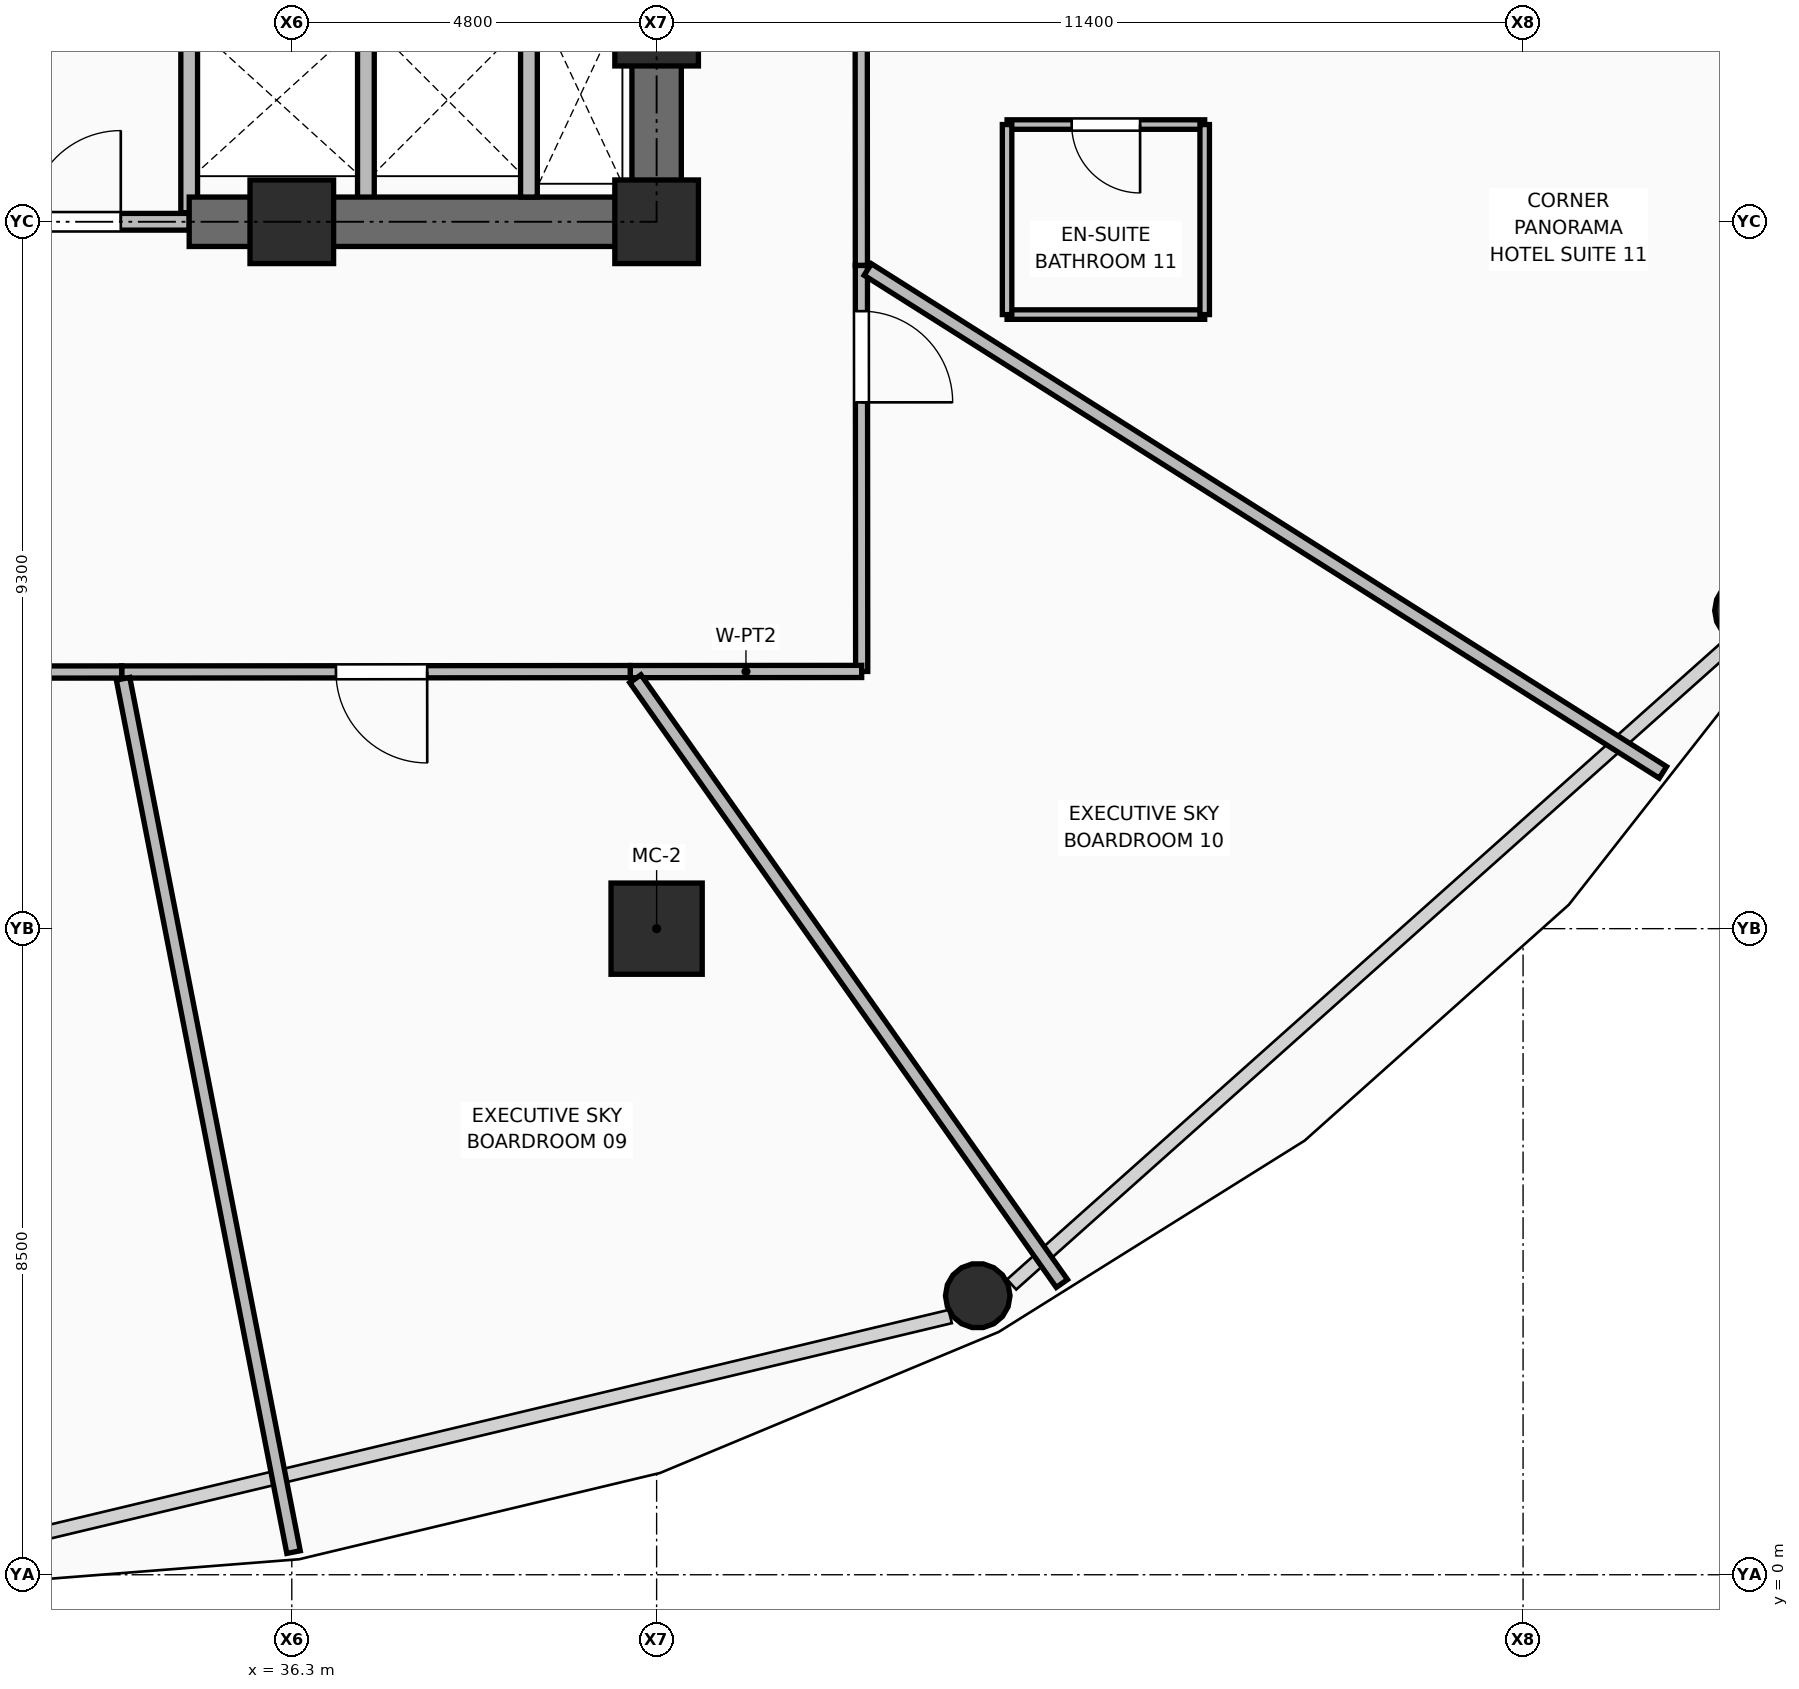
"""IFC4 building model, lengths in metres.
Left out: names, types, materials, properties, quantities, classifications, styles, units other than length and angle.
Written with IfcOpenShell. Run it as: python <this file> out.ifc"""

import sys

from ifc_helpers import new_model, si_unit, direction, frame, frame_2d, origin, origin_2d, place, context, subcontext, project, spatial, rectangle, hollow_rectangle, hollow_circle, extrude, element, fill, save


model = new_model("IFC4")
c1 = context("Model", 3, precision=1e-05, world=origin(), true_north=direction((0.0, 1.0)))
c2 = subcontext(c1, "Body", "Model", "MODEL_VIEW")
j1 = project(units=[si_unit("LENGTHUNIT", "METRE"), si_unit("PLANEANGLEUNIT", "RADIAN")], contexts=[c1])
p1 = place(None, origin())
s1 = spatial("IfcSite", under=j1, at=p1, CompositionType="ELEMENT")
p2 = place(p1, origin())
s2 = spatial("IfcBuilding", under=s1, at=p2, CompositionType="ELEMENT")
p3 = place(p2, frame((0.0, 0.0, 72.0)))
s3 = spatial("IfcBuildingStorey", under=s2, at=p3, CompositionType="ELEMENT", Elevation=72.0)
for number, where, z_axis, x_axis in (
    (1, (36.3, 17.8, 0.0), (0.0, 0.0, 1.0), (1.0, 0.0, 0.0)),
    (2, (41.1, 17.8, 0.0), (0.0, 0.0, 1.0), (1.0, 0.0, 0.0)),
    (3, (41.1, 20.4, 0.0), (0.0, 0.0, 1.0), (1.0, 0.0, 0.0)),
):
    element("IfcColumn", number, at=place(p3, frame(where, z_axis=z_axis, x_axis=x_axis)), inside=s3, PredefinedType="COLUMN", context=c2, shape_type="SweptSolid", body=[
        extrude(rectangle(XDim=1.1, YDim=1.1, at=origin_2d()), origin(), (0.0, 0.0, 1.0), 3.75),
    ])
p4 = place(p3, frame((41.1, 8.5, 0.0), z_axis=(0.0, 0.0, 1.0), x_axis=(1.0, 0.0, 0.0)))
e4 = element("IfcColumn", 4, at=p4, inside=s3, PredefinedType="COLUMN", context=c2, shape_type="SweptSolid", body=[
    extrude(hollow_rectangle(XDim=1.2, YDim=1.2, WallThickness=0.045, at=origin_2d()), origin(), (0.0, 0.0, 1.0), 3.75),
])
for number, where, z_axis, x_axis in (
    (5, (45.325, 3.671, 0.0), (0.0, 0.0, 1.0), (1.0, 0.0, 0.0)),
    (6, (55.446, 12.685, 0.0), (0.0, 0.0, 1.0), (1.0, 0.0, 0.0)),
):
    element("IfcColumn", number, at=place(p3, frame(where, z_axis=z_axis, x_axis=x_axis)), inside=s3, PredefinedType="COLUMN", context=c2, shape_type="SweptSolid", body=[
        extrude(hollow_circle(Radius=0.425, WallThickness=0.04, at=origin_2d()), origin(), (0.0, 0.0, 1.0), 3.57),
    ])
p5 = place(p3, frame((34.95, 17.92, 0.0), z_axis=(0.0, 0.0, 1.0), x_axis=(0.0, 1.0, 0.0)))
e7 = element("IfcWall", 7, at=p5, inside=s3, PredefinedType="PARTITIONING", context=c2, shape_type="SweptSolid", body=[
    extrude(rectangle(XDim=2.47, YDim=0.22, at=frame_2d((1.235, 0.0))), origin(), (0.0, 0.0, 1.0), 2.928),
])
p6 = place(p3, frame((37.275, 18.08, 0.0), z_axis=(0.0, 0.0, 1.0), x_axis=(0.0, 1.0, 0.0)))
e8 = element("IfcWall", 8, at=p6, inside=s3, PredefinedType="PARTITIONING", context=c2, shape_type="SweptSolid", body=[
    extrude(rectangle(XDim=2.31, YDim=0.22, at=frame_2d((1.155, 0.0))), origin(), (0.0, 0.0, 1.0), 3.545),
])
p7 = place(p3, frame((32.45, 17.8, 0.0), z_axis=(0.0, 0.0, 1.0), x_axis=(1.0, 0.0, 0.0)))
e9 = element("IfcWall", 9, at=p7, inside=s3, PredefinedType="PARTITIONING", context=c2, shape_type="SweptSolid", body=[
    extrude(rectangle(XDim=2.5, YDim=0.22, at=frame_2d((1.25, 0.0))), origin(), (0.0, 0.0, 1.0), 2.928),
])
p8 = place(p7, frame((0.4, 0.0, 0.0)))
e10 = element("IfcOpeningElement", 10, at=p8, cuts=e9, PredefinedType="OPENING", context=c2, shape_type="SweptSolid", body=[
    extrude(rectangle(XDim=1.2, YDim=2.1, at=frame_2d((0.6, 1.05))), frame((0.0, 0.12, 0.0), z_axis=(0.0, -1.0, 0.0), x_axis=(1.0, 0.0, 0.0)), (0.0, 0.0, 1.0), 0.24),
])
p9 = place(p3, frame((34.95, 17.8, 0.0), z_axis=(0.0, 0.0, 1.0), x_axis=(1.0, 0.0, 0.0)))
e11 = element("IfcWall", 11, at=p9, inside=s3, PredefinedType="SHEAR", context=c2, shape_type="SweptSolid", body=[
    extrude(rectangle(XDim=6.475, YDim=0.65, at=frame_2d((3.238, 0.0))), origin(), (0.0, 0.0, 1.0), 3.57),
])
p10 = place(p3, frame((41.1, 18.125, 0.0), z_axis=(0.0, 0.0, 1.0), x_axis=(0.0, 1.0, 0.0)))
e12 = element("IfcWall", 12, at=p10, inside=s3, PredefinedType="SHEAR", context=c2, shape_type="SweptSolid", body=[
    extrude(rectangle(XDim=14.0, YDim=0.65, at=frame_2d((7.0, 0.0))), origin(), (0.0, 0.0, 1.0), 3.57),
])
p11 = place(p10, frame((3.335, 0.0, 0.0)))
e13 = element("IfcOpeningElement", 13, at=p11, cuts=e12, PredefinedType="OPENING", context=c2, shape_type="SweptSolid", body=[
    extrude(rectangle(XDim=1.05, YDim=2.1, at=frame_2d((0.525, 1.05))), frame((0.0, 0.335, 0.0), z_axis=(0.0, -1.0, 0.0), x_axis=(1.0, 0.0, 0.0)), (0.0, 0.0, 1.0), 0.67),
])
p12 = place(p3, frame((39.42, 18.125, 0.0), z_axis=(0.0, 0.0, 1.0), x_axis=(0.0, 1.0, 0.0)))
e14 = element("IfcWall", 14, at=p12, inside=s3, PredefinedType="PARTITIONING", context=c2, shape_type="SweptSolid", body=[
    extrude(rectangle(XDim=2.825, YDim=0.22, at=frame_2d((1.413, 0.0))), origin(), (0.0, 0.0, 1.0), 3.55),
])
p13 = place(p3, frame((43.79, 23.539, 0.0), z_axis=(0.0, 0.0, 1.0), x_axis=(0.000618668198, -0.999999808625, 0.0)))
e15 = element("IfcWall", 15, at=p13, inside=s3, PredefinedType="PARTITIONING", context=c2, shape_type="SweptSolid", body=[
    extrude(rectangle(XDim=6.314, YDim=0.16, at=frame_2d((3.157, 0.0))), origin(), (0.0, 0.0, 1.0), 2.928),
])
p14 = place(p13, frame((2.257, 0.0, 0.0)))
e16 = element("IfcOpeningElement", 16, at=p14, cuts=e15, PredefinedType="OPENING", context=c2, shape_type="SweptSolid", body=[
    extrude(rectangle(XDim=1.2, YDim=2.1, at=frame_2d((0.6, 1.05))), frame((0.0, 0.09, 0.0), z_axis=(0.0, -1.0, 0.0), x_axis=(1.0, 0.0, 0.0)), (0.0, 0.0, 1.0), 0.18),
])
p15 = place(p3, frame((43.794, 17.225, 0.0), z_axis=(0.0, 0.0, 1.0), x_axis=(0.000777071576, -0.99999969808, 0.0)))
e17 = element("IfcWall", 17, at=p15, inside=s3, PredefinedType="PARTITIONING", context=c2, shape_type="SweptSolid", body=[
    extrude(rectangle(XDim=5.341, YDim=0.16, at=frame_2d((2.67, 0.0))), origin(), (0.0, 0.0, 1.0), 2.928),
])
p16 = place(p15, frame((0.601, 0.0, 0.0)))
e18 = element("IfcOpeningElement", 18, at=p16, cuts=e17, PredefinedType="OPENING", context=c2, shape_type="SweptSolid", body=[
    extrude(rectangle(XDim=1.2, YDim=2.1, at=frame_2d((0.6, 1.05))), frame((0.0, 0.09, 0.0), z_axis=(0.0, -1.0, 0.0), x_axis=(1.0, 0.0, 0.0)), (0.0, 0.0, 1.0), 0.18),
])
p17 = place(p3, frame((43.798, 11.884, 0.0), z_axis=(0.0, 0.0, 1.0), x_axis=(-0.999999794312, -0.000641385261, 0.0)))
e19 = element("IfcWall", 19, at=p17, inside=s3, PredefinedType="PARTITIONING", context=c2, shape_type="SweptSolid", body=[
    extrude(rectangle(XDim=3.045, YDim=0.16, at=frame_2d((1.522, 0.0))), origin(), (0.0, 0.0, 1.0), 2.928),
])
p18 = place(p3, frame((40.753, 11.882, 0.0), z_axis=(0.0, 0.0, 1.0), x_axis=(-0.999999706426, -0.00076625534, 0.0)))
e20 = element("IfcWall", 20, at=p18, inside=s3, PredefinedType="PARTITIONING", context=c2, shape_type="SweptSolid", body=[
    extrude(rectangle(XDim=6.691, YDim=0.16, at=frame_2d((3.345, 0.0))), origin(), (0.0, 0.0, 1.0), 3.55),
])
p19 = place(p18, frame((2.672, 0.0, 0.0)))
e21 = element("IfcOpeningElement", 21, at=p19, cuts=e20, PredefinedType="OPENING", context=c2, shape_type="SweptSolid", body=[
    extrude(rectangle(XDim=1.2, YDim=2.1, at=frame_2d((0.6, 1.05))), frame((0.0, 0.09, 0.0), z_axis=(0.0, -1.0, 0.0), x_axis=(1.0, 0.0, 0.0)), (0.0, 0.0, 1.0), 0.18),
])
p20 = place(p3, frame((34.062, 11.877, 0.0), z_axis=(0.0, 0.0, 1.0), x_axis=(-0.99999976071, -0.000691794728, 0.0)))
e22 = element("IfcWall", 22, at=p20, inside=s3, PredefinedType="PARTITIONING", context=c2, shape_type="SweptSolid", body=[
    extrude(rectangle(XDim=11.646, YDim=0.16, at=frame_2d((5.823, 0.0))), origin(), (0.0, 0.0, 1.0), 2.928),
])
p21 = place(p20, frame((5.223, 0.0, 0.0)))
e23 = element("IfcOpeningElement", 23, at=p21, cuts=e22, PredefinedType="OPENING", context=c2, shape_type="SweptSolid", body=[
    extrude(rectangle(XDim=1.2, YDim=2.1, at=frame_2d((0.6, 1.05))), frame((0.0, 0.09, 0.0), z_axis=(0.0, -1.0, 0.0), x_axis=(1.0, 0.0, 0.0)), (0.0, 0.0, 1.0), 0.18),
])
p22 = place(p3, frame((34.08, 11.788, 0.0), z_axis=(0.0, 0.0, 1.0), x_axis=(0.191590227311, -0.981475004674, 0.0)))
e24 = element("IfcWall", 24, at=p22, inside=s3, PredefinedType="PARTITIONING", context=c2, shape_type="SweptSolid", body=[
    extrude(rectangle(XDim=11.707, YDim=0.18, at=frame_2d((5.854, 0.0))), origin(), (0.0, 0.0, 1.0), 2.775),
])
p23 = place(p3, frame((40.82, 11.788, 0.0), z_axis=(0.0, 0.0, 1.0), x_axis=(0.576393717645, -0.817172125234, 0.0)))
e25 = element("IfcWall", 25, at=p23, inside=s3, PredefinedType="PARTITIONING", context=c2, shape_type="SweptSolid", body=[
    extrude(rectangle(XDim=9.736, YDim=0.18, at=frame_2d((4.868, 0.0))), origin(), (0.0, 0.0, 1.0), 2.775),
])
p24 = place(p3, frame((43.878, 17.172, 0.0), z_axis=(0.0, 0.0, 1.0), x_axis=(0.845177570146, -0.534485617132, 0.0)))
e26 = element("IfcWall", 26, at=p24, inside=s3, PredefinedType="PARTITIONING", context=c2, shape_type="SweptSolid", body=[
    extrude(rectangle(XDim=12.379, YDim=0.18, at=frame_2d((6.189, 0.0))), origin(), (0.0, 0.0, 1.0), 2.775),
])
p25 = place(p3, frame((45.711, 16.579, 0.0), z_axis=(0.0, 0.0, 1.0), x_axis=(1.0, 0.0, 0.0)))
e27 = element("IfcWall", 27, at=p25, inside=s3, PredefinedType="PARTITIONING", context=c2, shape_type="SweptSolid", body=[
    extrude(rectangle(XDim=2.6, YDim=0.125, at=frame_2d((1.3, 0.0))), origin(), (0.0, 0.0, 1.0), 3.55),
])
p26 = place(p3, frame((45.711, 19.079, 0.0), z_axis=(0.0, 0.0, 1.0), x_axis=(1.0, 0.0, 0.0)))
e28 = element("IfcWall", 28, at=p26, inside=s3, PredefinedType="PARTITIONING", context=c2, shape_type="SweptSolid", body=[
    extrude(rectangle(XDim=2.6, YDim=0.125, at=frame_2d((1.3, 0.0))), origin(), (0.0, 0.0, 1.0), 3.55),
])
p27 = place(p26, frame((0.85, 0.0, 0.0)))
e29 = element("IfcOpeningElement", 29, at=p27, cuts=e28, PredefinedType="OPENING", context=c2, shape_type="SweptSolid", body=[
    extrude(rectangle(XDim=0.9, YDim=2.1, at=frame_2d((0.45, 1.05))), frame((0.0, 0.073, 0.0), z_axis=(0.0, -1.0, 0.0), x_axis=(1.0, 0.0, 0.0)), (0.0, 0.0, 1.0), 0.145),
])
for number, where, z_axis, x_axis in (
    (30, (45.711, 16.579, 0.0), (0.0, 0.0, 1.0), (0.0, 1.0, 0.0)),
    (31, (48.311, 16.579, 0.0), (0.0, 0.0, 1.0), (0.0, 1.0, 0.0)),
):
    element("IfcWall", number, at=place(p3, frame(where, z_axis=z_axis, x_axis=x_axis)), inside=s3, PredefinedType="PARTITIONING", context=c2, shape_type="SweptSolid", body=[
        extrude(rectangle(XDim=2.5, YDim=0.125, at=frame_2d((1.25, 0.0))), origin(), (0.0, 0.0, 1.0), 3.55),
    ])
p28 = place(p8, origin())
e32 = element("IfcDoor", 32, at=p28, inside=s3, OperationType="SINGLE_SWING_RIGHT", PredefinedType="DOOR", context=c2, shape_type="SweptSolid", body=[
    extrude(rectangle(XDim=1.2, YDim=2.1, at=frame_2d((0.6, 1.05))), frame((0.0, 0.025, 0.0), z_axis=(0.0, -1.0, 0.0), x_axis=(1.0, 0.0, 0.0)), (0.0, 0.0, 1.0), 0.05),
])
fill(e10, e32)
p29 = place(p19, origin())
e33 = element("IfcDoor", 33, at=p29, inside=s3, OperationType="SINGLE_SWING_LEFT", PredefinedType="DOOR", context=c2, shape_type="SweptSolid", body=[
    extrude(rectangle(XDim=1.2, YDim=2.1, at=frame_2d((0.6, 1.05))), frame((0.0, 0.025, 0.0), z_axis=(0.0, -1.0, 0.0), x_axis=(1.0, 0.0, 0.0)), (0.0, 0.0, 1.0), 0.05),
])
fill(e21, e33)
p30 = place(p16, origin())
e34 = element("IfcDoor", 34, at=p30, inside=s3, OperationType="SINGLE_SWING_RIGHT", PredefinedType="DOOR", context=c2, shape_type="SweptSolid", body=[
    extrude(rectangle(XDim=1.2, YDim=2.1, at=frame_2d((0.6, 1.05))), frame((0.0, 0.025, 0.0), z_axis=(0.0, -1.0, 0.0), x_axis=(1.0, 0.0, 0.0)), (0.0, 0.0, 1.0), 0.05),
])
fill(e18, e34)
p31 = place(p27, frame((0.9, 0.0, 0.0), z_axis=(0.0, 0.0, 1.0), x_axis=(-1.0, 0.0, 0.0)))
e35 = element("IfcDoor", 35, at=p31, inside=s3, OperationType="SINGLE_SWING_LEFT", PredefinedType="DOOR", context=c2, shape_type="SweptSolid", body=[
    extrude(rectangle(XDim=0.9, YDim=2.1, at=frame_2d((0.45, 1.05))), frame((0.0, 0.025, 0.0), z_axis=(0.0, -1.0, 0.0), x_axis=(1.0, 0.0, 0.0)), (0.0, 0.0, 1.0), 0.05),
])
fill(e29, e35)
save(model, sys.argv[1])
